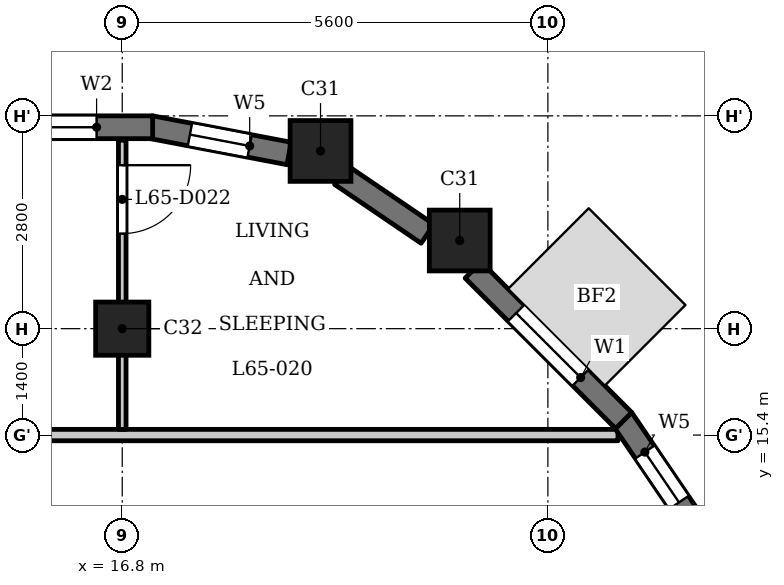
"""IFC4 building model, lengths in metres.
Left out: names, types, materials, properties, quantities, classifications, styles, units other than length and angle.
Written with IfcOpenShell. Run it as: python <this file> out.ifc"""

import sys

from ifc_helpers import new_model, si_unit, direction, frame, frame_2d, origin, origin_2d, place, context, subcontext, project, spatial, rectangle, extrude, element, fill, save


model = new_model("IFC4")
c1 = context("Model", 3, precision=1e-05, world=origin(), true_north=direction((0.0, 1.0)))
c2 = subcontext(c1, "Body", "Model", "MODEL_VIEW")
j1 = project(units=[si_unit("LENGTHUNIT", "METRE"), si_unit("PLANEANGLEUNIT", "RADIAN")], contexts=[c1])
p1 = place(None, origin())
s1 = spatial("IfcSite", under=j1, at=p1, CompositionType="ELEMENT")
p2 = place(p1, origin())
s2 = spatial("IfcBuilding", under=s1, at=p2, CompositionType="ELEMENT")
p3 = place(p2, frame((0.0, 0.0, 252.2)))
s3 = spatial("IfcBuildingStorey", under=s2, at=p3, CompositionType="ELEMENT", Elevation=252.2)
for number, where, z_axis, x_axis in (
    (1, (21.24, 17.96, 0.0), (0.0, 0.0, 1.0), (1.0, 0.0, 0.0)),
    (2, (19.409, 19.138, 0.0), (0.0, 0.0, 1.0), (1.0, 0.0, 0.0)),
):
    element("IfcColumn", number, at=place(p3, frame(where, z_axis=z_axis, x_axis=x_axis)), inside=s3, PredefinedType="COLUMN", context=c2, shape_type="SweptSolid", body=[
        extrude(rectangle(XDim=0.8, YDim=0.8, at=origin_2d()), origin(), (0.0, 0.0, 1.0), 3.5),
    ])
p4 = place(p3, frame((16.8, 16.8, 0.0), z_axis=(0.0, 0.0, 1.0), x_axis=(1.0, 0.0, 0.0)))
e3 = element("IfcColumn", 3, at=p4, inside=s3, PredefinedType="COLUMN", context=c2, shape_type="SweptSolid", body=[
    extrude(rectangle(XDim=0.7, YDim=0.7, at=origin_2d()), origin(), (0.0, 0.0, 1.0), 3.5),
])
p5 = place(p3, frame((24.422, 14.078, 0.0), z_axis=(0.0, 0.0, 1.0), x_axis=(-0.562054549384, 0.827100165347, 0.0)))
e4 = element("IfcWall", 4, at=p5, inside=s3, PredefinedType="SOLIDWALL", context=c2, shape_type="SweptSolid", body=[
    extrude(rectangle(XDim=1.856, YDim=0.3, at=frame_2d((0.928, 0.0))), origin(), (0.0, 0.0, 1.0), 2.55),
])
p6 = place(p5, frame((0.528, 0.0, 0.6)))
e5 = element("IfcOpeningElement", 5, at=p6, cuts=e4, PredefinedType="OPENING", context=c2, shape_type="SweptSolid", body=[
    extrude(rectangle(XDim=0.8, YDim=1.55, at=frame_2d((0.4, 0.775))), frame((0.0, 0.16, 0.0), z_axis=(0.0, -1.0, 0.0), x_axis=(1.0, 0.0, 0.0)), (0.0, 0.0, 1.0), 0.32),
])
p7 = place(p3, frame((23.397, 15.591, 0.0), z_axis=(0.0, 0.0, 1.0), x_axis=(-0.707150377276, 0.707063182409, 0.0)))
e6 = element("IfcWall", 6, at=p7, inside=s3, PredefinedType="SOLIDWALL", context=c2, shape_type="SweptSolid", body=[
    extrude(rectangle(XDim=2.8, YDim=0.3, at=frame_2d((1.4, 0.0))), origin(), (0.0, 0.0, 1.0), 2.55),
])
p8 = place(p7, frame((0.8, 0.0, 0.6)))
e7 = element("IfcOpeningElement", 7, at=p8, cuts=e6, PredefinedType="OPENING", context=c2, shape_type="SweptSolid", body=[
    extrude(rectangle(XDim=1.2, YDim=1.55, at=frame_2d((0.6, 0.775))), frame((0.0, 0.16, 0.0), z_axis=(0.0, -1.0, 0.0), x_axis=(1.0, 0.0, 0.0)), (0.0, 0.0, 1.0), 0.32),
])
p9 = place(p3, frame((20.817, 18.048, 0.0), z_axis=(0.0, 0.0, 1.0), x_axis=(-0.827025410886, 0.562164539747, 0.0)))
e8 = element("IfcWall", 8, at=p9, inside=s3, PredefinedType="SOLIDWALL", context=c2, shape_type="SweptSolid", body=[
    extrude(rectangle(XDim=1.377, YDim=0.3, at=frame_2d((0.688, 0.0))), origin(), (0.0, 0.0, 1.0), 2.55),
])
p10 = place(p3, frame((18.995, 19.105, 0.0), z_axis=(0.0, 0.0, 1.0), x_axis=(-0.982301706131, 0.187305520826, 0.0)))
e9 = element("IfcWall", 9, at=p10, inside=s3, PredefinedType="SOLIDWALL", context=c2, shape_type="SweptSolid", body=[
    extrude(rectangle(XDim=1.856, YDim=0.3, at=frame_2d((0.928, 0.0))), origin(), (0.0, 0.0, 1.0), 2.55),
])
p11 = place(p10, frame((0.528, 0.0, 0.6)))
e10 = element("IfcOpeningElement", 10, at=p11, cuts=e9, PredefinedType="OPENING", context=c2, shape_type="SweptSolid", body=[
    extrude(rectangle(XDim=0.8, YDim=1.55, at=frame_2d((0.4, 0.775))), frame((0.0, 0.16, 0.0), z_axis=(0.0, -1.0, 0.0), x_axis=(1.0, 0.0, 0.0)), (0.0, 0.0, 1.0), 0.32),
])
p12 = place(p3, frame((17.2, 19.45, 0.0), z_axis=(0.0, 0.0, 1.0), x_axis=(-1.0, 0.0, 0.0)))
e11 = element("IfcWall", 11, at=p12, inside=s3, PredefinedType="SOLIDWALL", context=c2, shape_type="SweptSolid", body=[
    extrude(rectangle(XDim=2.8, YDim=0.3, at=frame_2d((1.4, 0.0))), origin(), (0.0, 0.0, 1.0), 2.55),
])
p13 = place(p12, frame((0.738, 0.0, 0.9)))
e12 = element("IfcOpeningElement", 12, at=p13, cuts=e11, PredefinedType="OPENING", context=c2, shape_type="SweptSolid", body=[
    extrude(rectangle(XDim=1.8, YDim=1.25, at=frame_2d((0.9, 0.625))), frame((0.0, 0.16, 0.0), z_axis=(0.0, -1.0, 0.0), x_axis=(1.0, 0.0, 0.0)), (0.0, 0.0, 1.0), 0.32),
])
p14 = place(p3, frame((-23.55, 15.4, 0.0), z_axis=(0.0, 0.0, 1.0), x_axis=(1.0, 0.0, 0.0)))
e13 = element("IfcWall", 13, at=p14, inside=s3, PredefinedType="PARTITIONING", context=c2, shape_type="SweptSolid", body=[
    extrude(rectangle(XDim=46.872, YDim=0.15, at=frame_2d((23.436, 0.0))), origin(), (0.0, 0.0, 1.0), 3.2),
])
p15 = place(p14, frame((8.05, 0.0, 0.0)))
e14 = element("IfcOpeningElement", 14, at=p15, cuts=e13, PredefinedType="OPENING", context=c2, shape_type="SweptSolid", body=[
    extrude(rectangle(XDim=1.0, YDim=2.1, at=frame_2d((0.5, 1.05))), frame((0.0, 0.085, 0.0), z_axis=(0.0, -1.0, 0.0), x_axis=(1.0, 0.0, 0.0)), (0.0, 0.0, 1.0), 0.17),
])
p16 = place(p14, frame((15.05, 0.0, 0.0)))
e15 = element("IfcOpeningElement", 15, at=p16, cuts=e13, PredefinedType="OPENING", context=c2, shape_type="SweptSolid", body=[
    extrude(rectangle(XDim=1.0, YDim=2.1, at=frame_2d((0.5, 1.05))), frame((0.0, 0.085, 0.0), z_axis=(0.0, -1.0, 0.0), x_axis=(1.0, 0.0, 0.0)), (0.0, 0.0, 1.0), 0.17),
])
p17 = place(p14, frame((30.95, 0.0, 0.0)))
e16 = element("IfcOpeningElement", 16, at=p17, cuts=e13, PredefinedType="OPENING", context=c2, shape_type="SweptSolid", body=[
    extrude(rectangle(XDim=1.0, YDim=2.1, at=frame_2d((0.5, 1.05))), frame((0.0, 0.085, 0.0), z_axis=(0.0, -1.0, 0.0), x_axis=(1.0, 0.0, 0.0)), (0.0, 0.0, 1.0), 0.17),
])
p18 = place(p14, frame((38.2, 0.0, 0.0)))
e17 = element("IfcOpeningElement", 17, at=p18, cuts=e13, PredefinedType="OPENING", context=c2, shape_type="SweptSolid", body=[
    extrude(rectangle(XDim=1.0, YDim=2.1, at=frame_2d((0.5, 1.05))), frame((0.0, 0.085, 0.0), z_axis=(0.0, -1.0, 0.0), x_axis=(1.0, 0.0, 0.0)), (0.0, 0.0, 1.0), 0.17),
])
p19 = place(p3, frame((16.8, 15.475, 0.0), z_axis=(0.0, 0.0, 1.0), x_axis=(0.0, 1.0, 0.0)))
e18 = element("IfcWall", 18, at=p19, inside=s3, PredefinedType="PARTITIONING", context=c2, shape_type="SweptSolid", body=[
    extrude(rectangle(XDim=3.805, YDim=0.1, at=frame_2d((1.902, 0.0))), origin(), (0.0, 0.0, 1.0), 3.2),
])
p20 = place(p19, frame((2.576, 0.0, 0.0)))
e19 = element("IfcOpeningElement", 19, at=p20, cuts=e18, PredefinedType="OPENING", context=c2, shape_type="SweptSolid", body=[
    extrude(rectangle(XDim=0.9, YDim=2.1, at=frame_2d((0.45, 1.05))), frame((0.0, 0.06, 0.0), z_axis=(0.0, -1.0, 0.0), x_axis=(1.0, 0.0, 0.0)), (0.0, 0.0, 1.0), 0.12),
])
p21 = place(p20, origin())
e20 = element("IfcDoor", 20, at=p21, inside=s3, OperationType="SINGLE_SWING_RIGHT", PredefinedType="DOOR", context=c2, shape_type="SweptSolid", body=[
    extrude(rectangle(XDim=0.9, YDim=2.1, at=frame_2d((0.45, 1.05))), frame((0.0, 0.025, 0.0), z_axis=(0.0, -1.0, 0.0), x_axis=(1.0, 0.0, 0.0)), (0.0, 0.0, 1.0), 0.05),
])
fill(e19, e20)
p22 = place(p6, origin())
e21 = element("IfcWindow", 21, at=p22, inside=s3, PartitioningType="SINGLE_PANEL", PredefinedType="WINDOW", context=c2, shape_type="SweptSolid", body=[
    extrude(rectangle(XDim=0.8, YDim=1.55, at=frame_2d((0.4, 0.775))), frame((0.0, 0.03, 0.0), z_axis=(0.0, -1.0, 0.0), x_axis=(1.0, 0.0, 0.0)), (0.0, 0.0, 1.0), 0.06),
])
fill(e5, e21)
p23 = place(p8, origin())
e22 = element("IfcWindow", 22, at=p23, inside=s3, PartitioningType="SINGLE_PANEL", PredefinedType="WINDOW", context=c2, shape_type="SweptSolid", body=[
    extrude(rectangle(XDim=1.2, YDim=1.55, at=frame_2d((0.6, 0.775))), frame((0.0, 0.03, 0.0), z_axis=(0.0, -1.0, 0.0), x_axis=(1.0, 0.0, 0.0)), (0.0, 0.0, 1.0), 0.06),
])
fill(e7, e22)
p24 = place(p11, origin())
e23 = element("IfcWindow", 23, at=p24, inside=s3, PartitioningType="SINGLE_PANEL", PredefinedType="WINDOW", context=c2, shape_type="SweptSolid", body=[
    extrude(rectangle(XDim=0.8, YDim=1.55, at=frame_2d((0.4, 0.775))), frame((0.0, 0.03, 0.0), z_axis=(0.0, -1.0, 0.0), x_axis=(1.0, 0.0, 0.0)), (0.0, 0.0, 1.0), 0.06),
])
fill(e10, e23)
p25 = place(p13, origin())
e24 = element("IfcWindow", 24, at=p25, inside=s3, PartitioningType="SINGLE_PANEL", PredefinedType="WINDOW", context=c2, shape_type="SweptSolid", body=[
    extrude(rectangle(XDim=1.8, YDim=1.25, at=frame_2d((0.9, 0.625))), frame((0.0, 0.03, 0.0), z_axis=(0.0, -1.0, 0.0), x_axis=(1.0, 0.0, 0.0)), (0.0, 0.0, 1.0), 0.06),
])
fill(e12, e24)
save(model, sys.argv[1])
